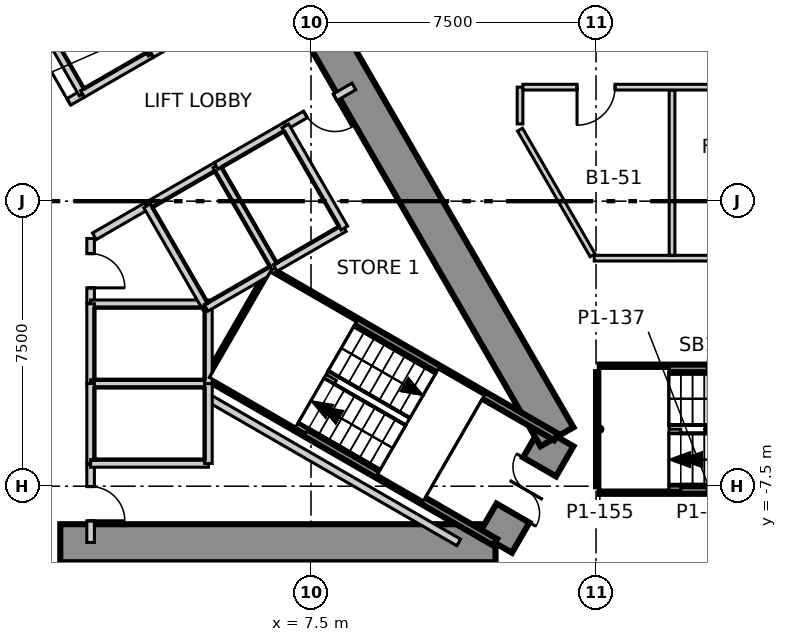
"""IFC4 building model, lengths in metres.
Left out: names, types, materials, properties, quantities, classifications, styles, units other than length and angle.
Written with IfcOpenShell. Run it as: python <this file> out.ifc"""

import sys

from ifc_helpers import new_model, si_unit, direction, frame, frame_2d, origin, place, context, subcontext, project, spatial, polyline, rectangle, outline, extrude, element, fill, save


model = new_model("IFC4")
c1 = context("Model", 3, precision=1e-05, world=origin(), true_north=direction((0.0, 1.0)))
c2 = subcontext(c1, "Body", "Model", "MODEL_VIEW")
j1 = project(units=[si_unit("LENGTHUNIT", "METRE"), si_unit("PLANEANGLEUNIT", "RADIAN")], contexts=[c1])
p1 = place(None, origin())
s1 = spatial("IfcSite", under=j1, at=p1, CompositionType="ELEMENT")
p2 = place(p1, origin())
s2 = spatial("IfcBuilding", under=s1, at=p2, CompositionType="ELEMENT")
p3 = place(p2, frame((0.0, 0.0, -5.5)))
s3 = spatial("IfcBuildingStorey", under=s2, at=p3, CompositionType="ELEMENT", Elevation=-5.5)
p4 = place(p3, frame((34.944, -16.125, -0.4), z_axis=(0.0, 0.0, 1.0), x_axis=(-0.500003790369, 0.866023215403, 0.0)))
e1 = element("IfcWall", 1, at=p4, inside=s3, PredefinedType="SOLIDWALL", context=c2, shape_type="SweptSolid", body=[
    extrude(rectangle(XDim=62.874, YDim=0.6, at=frame_2d((31.437, 0.0))), origin(), (0.0, 0.0, 1.0), 5.5),
])
p5 = place(p3, frame((-12.355, -9.0, -0.4), z_axis=(0.0, 0.0, 1.0), x_axis=(1.0, 0.0, 0.0)))
e2 = element("IfcWall", 2, at=p5, inside=s3, PredefinedType="SHEAR", context=c2, shape_type="SweptSolid", body=[
    extrude(outline(polyline([(-0.289, -0.5), (1.656, -0.5), (3.601, -0.5), (5.547, -0.5), (7.492, -0.5), (9.437, -0.5), (11.382, -0.5), (13.328, -0.5), (15.273, -0.5), (17.218, -0.5), (19.163, -0.5), (21.109, -0.5), (23.054, -0.5), (24.999, -0.5), (24.422, 0.5), (22.566, 0.5), (20.709, 0.5), (18.853, 0.5), (16.996, 0.5), (15.14, 0.5), (13.283, 0.5), (11.427, 0.5), (9.57, 0.5), (7.714, 0.5), (5.857, 0.5), (4.001, 0.5), (2.145, 0.5), (0.288, 0.5), (-0.289, -0.5)])), origin(), (0.0, 0.0, 1.0), 5.5),
])
p6 = place(p5, frame((11.455, 0.0, 0.4)))
e3 = element("IfcOpeningElement", 3, at=p6, cuts=e2, PredefinedType="OPENING", context=c2, shape_type="SweptSolid", body=[
    extrude(rectangle(XDim=1.8, YDim=2.1, at=frame_2d((0.9, 1.05))), frame((0.0, 0.51, 0.0), z_axis=(0.0, -1.0, 0.0), x_axis=(1.0, 0.0, 0.0)), (0.0, 0.0, 1.0), 1.02),
])
p7 = place(p3, frame((12.355, -9.0, -0.4), z_axis=(0.0, 0.0, 1.0), x_axis=(0.500077567175, 0.865980615723, 0.0)))
e4 = element("IfcWall", 4, at=p7, inside=s3, PredefinedType="SHEAR", context=c2, shape_type="SweptSolid", body=[
    extrude(outline(polyline([(-0.288, -0.5), (1.617, -0.5), (3.522, -0.5), (2.945, 0.5), (1.617, 0.5), (0.289, 0.499), (-0.288, -0.5)])), origin(), (0.0, 0.0, 1.0), 5.5),
])
p8 = place(p7, frame((0.917, 0.0, 0.4)))
e5 = element("IfcOpeningElement", 5, at=p8, cuts=e4, PredefinedType="OPENING", context=c2, shape_type="SweptSolid", body=[
    extrude(rectangle(XDim=1.4, YDim=2.1, at=frame_2d((0.7, 1.05))), frame((0.0, 0.51, 0.0), z_axis=(0.0, -1.0, 0.0), x_axis=(1.0, 0.0, 0.0)), (0.0, 0.0, 1.0), 1.02),
])
p9 = place(p3, frame((13.972, -6.2, -0.4), z_axis=(0.0, 0.0, 1.0), x_axis=(-0.499992141631, 0.866029940768, 0.0)))
e6 = element("IfcWall", 6, at=p9, inside=s3, PredefinedType="SHEAR", context=c2, shape_type="SweptSolid", body=[
    extrude(outline(polyline([(-0.288, -0.5), (1.657, -0.5), (3.602, -0.5), (5.547, -0.5), (7.493, -0.5), (9.438, -0.5), (11.383, -0.5), (13.328, -0.5), (15.273, -0.5), (17.218, -0.499), (19.164, -0.499), (21.109, -0.499), (23.054, -0.499), (24.999, -0.499), (24.422, 0.5), (22.566, 0.5), (20.709, 0.5), (18.853, 0.5), (16.996, 0.5), (15.14, 0.5), (13.283, 0.5), (11.427, 0.5), (9.57, 0.5), (7.714, 0.5), (5.857, 0.5), (4.001, 0.5), (2.145, 0.5), (0.288, 0.5), (-0.288, -0.5)])), origin(), (0.0, 0.0, 1.0), 5.5),
])
p10 = place(p3, frame((14.953, -1.5, 0.0), z_axis=(0.0, 0.0, 1.0), x_axis=(1.0, 0.0, 0.0)))
e7 = element("IfcWall", 7, at=p10, inside=s3, PredefinedType="PARTITIONING", context=c2, shape_type="SweptSolid", body=[
    extrude(rectangle(XDim=9.047, YDim=0.15, at=frame_2d((4.523, 0.0))), origin(), (0.0, 0.0, 1.0), 4.5),
])
p11 = place(p10, frame((5.047, 0.0, 0.0)))
e8 = element("IfcOpeningElement", 8, at=p11, cuts=e7, PredefinedType="OPENING", context=c2, shape_type="SweptSolid", body=[
    extrude(rectangle(XDim=1.0, YDim=2.1, at=frame_2d((0.5, 1.05))), frame((0.0, 0.085, 0.0), z_axis=(0.0, -1.0, 0.0), x_axis=(1.0, 0.0, 0.0)), (0.0, 0.0, 1.0), 0.17),
])
p12 = place(p3, frame((17.0, -1.425, 0.0), z_axis=(0.0, 0.0, 1.0), x_axis=(0.0, 1.0, 0.0)))
e9 = element("IfcWall", 9, at=p12, inside=s3, PredefinedType="PARTITIONING", context=c2, shape_type="SweptSolid", body=[
    extrude(rectangle(XDim=4.35, YDim=0.15, at=frame_2d((2.175, 0.0))), origin(), (0.0, 0.0, 1.0), 5.1),
])
p13 = place(p3, frame((13.0, 1.883, 0.0), z_axis=(0.0, 0.0, 1.0), x_axis=(0.499995391149, -0.86602806469, 0.0)))
e10 = element("IfcWall", 10, at=p13, inside=s3, PredefinedType="PARTITIONING", context=c2, shape_type="SweptSolid", body=[
    extrude(rectangle(XDim=3.82, YDim=0.15, at=frame_2d((1.91, 0.0))), origin(), (0.0, 0.0, 1.0), 5.1),
])
p14 = place(p3, frame((13.0, 2.033, 0.0), z_axis=(0.0, 0.0, 1.0), x_axis=(0.0, 1.0, 0.0)))
e11 = element("IfcWall", 11, at=p14, inside=s3, PredefinedType="PARTITIONING", context=c2, shape_type="SweptSolid", body=[
    extrude(rectangle(XDim=0.967, YDim=0.15, at=frame_2d((0.483, 0.0))), origin(), (0.0, 0.0, 1.0), 5.1),
])
p15 = place(p3, frame((13.075, 3.0, 0.0), z_axis=(0.0, 0.0, 1.0), x_axis=(1.0, 0.0, 0.0)))
e12 = element("IfcWall", 12, at=p15, inside=s3, PredefinedType="PARTITIONING", context=c2, shape_type="SweptSolid", body=[
    extrude(rectangle(XDim=10.481, YDim=0.15, at=frame_2d((5.24, 0.0))), origin(), (0.0, 0.0, 1.0), 4.55),
])
p16 = place(p15, frame((1.425, 0.0, 0.0)))
e13 = element("IfcOpeningElement", 13, at=p16, cuts=e12, PredefinedType="OPENING", context=c2, shape_type="SweptSolid", body=[
    extrude(rectangle(XDim=1.0, YDim=2.1, at=frame_2d((0.5, 1.05))), frame((0.0, 0.085, 0.0), z_axis=(0.0, -1.0, 0.0), x_axis=(1.0, 0.0, 0.0)), (0.0, 0.0, 1.0), 0.17),
])
p17 = place(p3, frame((0.1, 2.021, 0.0), z_axis=(0.0, 0.0, 1.0), x_axis=(0.866188150584, 0.499718008269, 0.0)))
e14 = element("IfcWall", 14, at=p17, inside=s3, PredefinedType="SOLIDWALL", context=c2, shape_type="SweptSolid", body=[
    extrude(rectangle(XDim=1.585, YDim=0.2, at=frame_2d((0.792, 0.0))), origin(), (0.0, 0.0, 1.0), 5.1),
])
p18 = place(p17, frame((0.284, 0.0, 0.0)))
e15 = element("IfcOpeningElement", 15, at=p18, cuts=e14, PredefinedType="OPENING", context=c2, shape_type="SweptSolid", body=[
    extrude(rectangle(XDim=0.9, YDim=2.1, at=frame_2d((0.45, 1.05))), frame((0.0, 0.11, 0.0), z_axis=(0.0, -1.0, 0.0), x_axis=(1.0, 0.0, 0.0)), (0.0, 0.0, 1.0), 0.22),
])
p19 = place(p3, frame((1.7, -8.98, 0.0), z_axis=(0.0, 0.0, 1.0), x_axis=(0.0, 1.0, 0.0)))
e16 = element("IfcWall", 16, at=p19, inside=s3, PredefinedType="SOLIDWALL", context=c2, shape_type="SweptSolid", body=[
    extrude(rectangle(XDim=2.062, YDim=0.2, at=frame_2d((1.031, 0.0))), origin(), (0.0, 0.0, 1.0), 5.1),
])
p20 = place(p19, frame((0.57, 0.0, 0.0)))
e17 = element("IfcOpeningElement", 17, at=p20, cuts=e16, PredefinedType="OPENING", context=c2, shape_type="SweptSolid", body=[
    extrude(rectangle(XDim=0.9, YDim=2.1, at=frame_2d((0.45, 1.05))), frame((0.0, 0.11, 0.0), z_axis=(0.0, -1.0, 0.0), x_axis=(1.0, 0.0, 0.0)), (0.0, 0.0, 1.0), 0.22),
])
p21 = place(p3, frame((1.7, -2.682, 0.0), z_axis=(0.0, 0.0, 1.0), x_axis=(0.0, 1.0, 0.0)))
e18 = element("IfcWall", 18, at=p21, inside=s3, PredefinedType="SOLIDWALL", context=c2, shape_type="SweptSolid", body=[
    extrude(rectangle(XDim=1.701, YDim=0.2, at=frame_2d((0.851, 0.0))), origin(), (0.0, 0.0, 1.0), 5.1),
])
p22 = place(p21, frame((0.401, 0.0, 0.0)))
e19 = element("IfcOpeningElement", 19, at=p22, cuts=e18, PredefinedType="OPENING", context=c2, shape_type="SweptSolid", body=[
    extrude(rectangle(XDim=0.9, YDim=2.1, at=frame_2d((0.45, 1.05))), frame((0.0, 0.11, 0.0), z_axis=(0.0, -1.0, 0.0), x_axis=(1.0, 0.0, 0.0)), (0.0, 0.0, 1.0), 0.22),
])
p23 = place(p3, frame((1.8, -0.924, 0.0), z_axis=(0.0, 0.0, 1.0), x_axis=(0.865959917263, 0.500113408832, 0.0)))
e20 = element("IfcWall", 20, at=p23, inside=s3, PredefinedType="SOLIDWALL", context=c2, shape_type="SweptSolid", body=[
    extrude(rectangle(XDim=1.586, YDim=0.2, at=frame_2d((0.793, 0.0))), origin(), (0.0, 0.0, 1.0), 5.1),
])
p24 = place(p3, frame((6.841, 1.987, 0.0), z_axis=(0.0, 0.0, 1.0), x_axis=(0.866041665719, 0.499971832445, 0.0)))
e21 = element("IfcWall", 21, at=p24, inside=s3, PredefinedType="SOLIDWALL", context=c2, shape_type="SweptSolid", body=[
    extrude(rectangle(XDim=2.062, YDim=0.2, at=frame_2d((1.031, 0.0))), origin(), (0.0, 0.0, 1.0), 5.1),
])
p25 = place(p24, frame((0.592, 0.0, 0.0)))
e22 = element("IfcOpeningElement", 22, at=p25, cuts=e21, PredefinedType="OPENING", context=c2, shape_type="SweptSolid", body=[
    extrude(rectangle(XDim=0.9, YDim=2.1, at=frame_2d((0.45, 1.05))), frame((0.0, 0.11, 0.0), z_axis=(0.0, -1.0, 0.0), x_axis=(1.0, 0.0, 0.0)), (0.0, 0.0, 1.0), 0.22),
])
p26 = place(p3, frame((4.82, -5.188, 0.0), z_axis=(0.0, 0.0, 1.0), x_axis=(0.86599149085, -0.500058734325, 0.0)))
e23 = element("IfcWall", 23, at=p26, inside=s3, PredefinedType="SOLIDWALL", context=c2, shape_type="SweptSolid", body=[
    extrude(rectangle(XDim=7.583, YDim=0.2, at=frame_2d((3.792, 0.0))), origin(), (0.0, 0.0, 1.0), 5.1),
])
p27 = place(p3, frame((4.829, -4.636, 0.0), z_axis=(0.0, 0.0, 1.0), x_axis=(0.866013680014, -0.500020305616, 0.0)))
e24 = element("IfcWall", 24, at=p27, inside=s3, PredefinedType="SOLIDWALL", context=c2, shape_type="SweptSolid", body=[
    extrude(rectangle(XDim=8.68, YDim=0.2, at=frame_2d((4.34, 0.0))), origin(), (0.0, 0.0, 1.0), 5.1),
])
p28 = place(p3, frame((4.879, -4.549, 0.0), z_axis=(0.0, 0.0, 1.0), x_axis=(0.499958760481, 0.866049212123, 0.0)))
e25 = element("IfcWall", 25, at=p28, inside=s3, PredefinedType="SOLIDWALL", context=c2, shape_type="SweptSolid", body=[
    extrude(rectangle(XDim=3.1, YDim=0.2, at=frame_2d((1.55, 0.0))), origin(), (0.0, 0.0, 1.0), 5.1),
])
p29 = place(p3, frame((6.516, -1.914, 0.0), z_axis=(0.0, 0.0, 1.0), x_axis=(0.866006929508, -0.50003199702, 0.0)))
e26 = element("IfcWall", 26, at=p29, inside=s3, PredefinedType="SOLIDWALL", context=c2, shape_type="SweptSolid", body=[
    extrude(rectangle(XDim=8.58, YDim=0.2, at=frame_2d((4.29, 0.0))), origin(), (0.0, 0.0, 1.0), 5.1),
])
for number, where, z_axis, x_axis in (
    (27, (15.1, -4.4, 0.0), (0.0, 0.0, 1.0), (1.0, 0.0, 0.0)),
    (28, (15.1, -7.6, 0.0), (0.0, 0.0, 1.0), (1.0, 0.0, 0.0)),
):
    element("IfcWall", number, at=place(p3, frame(where, z_axis=z_axis, x_axis=x_axis)), inside=s3, PredefinedType="SOLIDWALL", context=c2, shape_type="SweptSolid", body=[
        extrude(rectangle(XDim=5.8, YDim=0.2, at=frame_2d((2.9, 0.0))), origin(), (0.0, 0.0, 1.0), 5.1),
    ])
p30 = place(p3, frame((15.1, -7.5, 0.0), z_axis=(0.0, 0.0, 1.0), x_axis=(0.0, 1.0, 0.0)))
e29 = element("IfcWall", 29, at=p30, inside=s3, PredefinedType="SOLIDWALL", context=c2, shape_type="SweptSolid", body=[
    extrude(rectangle(XDim=3.0, YDim=0.2, at=frame_2d((1.5, 0.0))), origin(), (0.0, 0.0, 1.0), 5.1),
])
p31 = place(p3, frame((4.8, -2.7, 3.9), z_axis=(0.0, 0.0, 1.0), x_axis=(-1.0, 0.0, 0.0)))
e30 = element("IfcWall", 30, at=p31, inside=s3, PredefinedType="SOLIDWALL", context=c2, shape_type="SweptSolid", body=[
    extrude(outline(polyline([(-0.1, -0.1), (0.1, 0.1), (1.55, 0.1), (3.0, 0.1), (3.2, -0.1), (1.55, -0.1), (-0.1, -0.1)])), origin(), (0.0, 0.0, 1.0), 1.2),
])
p32 = place(p3, frame((1.7, -2.7, 3.9), z_axis=(0.0, 0.0, 1.0), x_axis=(0.0, -1.0, 0.0)))
e31 = element("IfcWall", 31, at=p32, inside=s3, PredefinedType="SOLIDWALL", context=c2, shape_type="SweptSolid", body=[
    extrude(outline(polyline([(2.0, 0.1), (2.2, -0.1), (1.05, -0.1), (-0.099, -0.1), (0.1, 0.1), (0.1, 0.1), (0.1, 0.1), (0.1, 0.1), (0.1, 0.1), (0.1, 0.1), (0.1, 0.1), (0.1, 0.1), (0.101, 0.1), (2.0, 0.1)])), origin(), (0.0, 0.0, 1.0), 1.2),
])
p33 = place(p3, frame((1.7, -4.8, 3.9), z_axis=(0.0, 0.0, 1.0), x_axis=(1.0, 0.0, 0.0)))
e32 = element("IfcWall", 32, at=p33, inside=s3, PredefinedType="SOLIDWALL", context=c2, shape_type="SweptSolid", body=[
    extrude(outline(polyline([(3.0, 0.1), (3.2, -0.1), (1.55, -0.1), (-0.099, -0.1), (0.1, 0.1), (0.1, 0.1), (0.1, 0.1), (0.1, 0.1), (0.1, 0.1), (0.1, 0.1), (0.1, 0.1), (0.1, 0.1), (0.101, 0.1), (1.551, 0.1), (3.0, 0.1)])), origin(), (0.0, 0.0, 1.0), 1.2),
])
p34 = place(p3, frame((4.8, -4.8, 3.9), z_axis=(0.0, 0.0, 1.0), x_axis=(0.0, 1.0, 0.0)))
e33 = element("IfcWall", 33, at=p34, inside=s3, PredefinedType="SOLIDWALL", context=c2, shape_type="SweptSolid", body=[
    extrude(outline(polyline([(1.999, 0.1), (2.0, 0.1), (2.0, 0.1), (2.0, 0.1), (2.0, 0.1), (2.0, 0.1), (2.0, 0.1), (2.0, 0.1), (2.0, 0.1), (2.199, -0.1), (1.05, -0.1), (-0.099, -0.1), (0.1, 0.1), (0.1, 0.1), (0.1, 0.1), (0.1, 0.1), (0.1, 0.1), (0.1, 0.1), (0.1, 0.1), (0.1, 0.1), (0.1, 0.1), (1.999, 0.1)])), origin(), (0.0, 0.0, 1.0), 1.2),
])
p35 = place(p3, frame((1.7, -4.8, 3.9), z_axis=(0.0, 0.0, 1.0), x_axis=(0.0, -1.0, 0.0)))
e34 = element("IfcWall", 34, at=p35, inside=s3, PredefinedType="SOLIDWALL", context=c2, shape_type="SweptSolid", body=[
    extrude(outline(polyline([(2.0, 0.1), (2.2, -0.1), (1.15, -0.1), (0.1, -0.1), (0.1, -0.1), (0.1, 0.1), (2.0, 0.1)])), origin(), (0.0, 0.0, 1.0), 1.2),
])
p36 = place(p3, frame((1.7, -6.9, 3.9), z_axis=(0.0, 0.0, 1.0), x_axis=(1.0, 0.0, 0.0)))
e35 = element("IfcWall", 35, at=p36, inside=s3, PredefinedType="SOLIDWALL", context=c2, shape_type="SweptSolid", body=[
    extrude(outline(polyline([(3.0, 0.1), (3.2, -0.1), (1.55, -0.1), (-0.099, -0.1), (0.1, 0.1), (0.1, 0.1), (0.1, 0.1), (0.1, 0.1), (0.1, 0.1), (0.1, 0.1), (0.1, 0.1), (0.1, 0.1), (0.101, 0.1), (1.551, 0.1), (3.0, 0.1)])), origin(), (0.0, 0.0, 1.0), 1.2),
])
p37 = place(p3, frame((4.8, -6.9, 3.9), z_axis=(0.0, 0.0, 1.0), x_axis=(0.0, 1.0, 0.0)))
e36 = element("IfcWall", 36, at=p37, inside=s3, PredefinedType="SOLIDWALL", context=c2, shape_type="SweptSolid", body=[
    extrude(outline(polyline([(2.0, 0.1), (2.0, -0.1), (0.95, -0.1), (-0.099, -0.1), (0.1, 0.1), (0.1, 0.1), (0.1, 0.1), (0.1, 0.1), (0.1, 0.1), (0.1, 0.1), (0.1, 0.1), (0.1, 0.1), (0.1, 0.1), (2.0, 0.1)])), origin(), (0.0, 0.0, 1.0), 1.2),
])
p38 = place(p3, frame((-0.062, 5.507, 3.9), z_axis=(0.0, 0.0, 1.0), x_axis=(0.499958760481, -0.866049212123, 0.0)))
e37 = element("IfcWall", 37, at=p38, inside=s3, PredefinedType="SOLIDWALL", context=c2, shape_type="SweptSolid", body=[
    extrude(outline(polyline([(0.1, 0.1), (1.55, 0.1), (3.0, 0.1), (3.2, -0.1), (1.55, -0.1), (-0.1, -0.1), (0.1, 0.1)])), origin(), (0.0, 0.0, 1.0), 1.2),
])
p39 = place(p3, frame((1.488, 2.822, 3.9), z_axis=(0.0, 0.0, 1.0), x_axis=(0.866038466041, 0.499977374825, 0.0)))
e38 = element("IfcWall", 38, at=p39, inside=s3, PredefinedType="SOLIDWALL", context=c2, shape_type="SweptSolid", body=[
    extrude(outline(polyline([(2.0, 0.1), (2.2, -0.1), (1.05, -0.1), (-0.099, -0.1), (0.1, 0.1), (0.1, 0.1), (0.1, 0.1), (0.1, 0.1), (0.1, 0.1), (0.1, 0.1), (0.1, 0.1), (0.1, 0.1), (0.1, 0.1), (2.0, 0.1)])), origin(), (0.0, 0.0, 1.0), 1.2),
])
p40 = place(p3, frame((3.307, 3.872, 3.9), z_axis=(0.0, 0.0, 1.0), x_axis=(-0.499933790963, 0.866063626216, 0.0)))
e39 = element("IfcWall", 39, at=p40, inside=s3, PredefinedType="SOLIDWALL", context=c2, shape_type="SweptSolid", body=[
    extrude(outline(polyline([(3.0, 0.1), (3.2, -0.1), (1.55, -0.1), (-0.099, -0.1), (0.1, 0.1), (0.1, 0.1), (0.1, 0.1), (0.1, 0.1), (0.1, 0.1), (0.1, 0.1), (0.1, 0.1), (0.101, 0.1), (0.101, 0.1), (0.101, 0.1), (1.551, 0.1), (3.0, 0.1)])), origin(), (0.0, 0.0, 1.0), 1.2),
])
p41 = place(p3, frame((3.307, 3.872, 3.9), z_axis=(0.0, 0.0, 1.0), x_axis=(0.866067520717, 0.499927044236, 0.0)))
e40 = element("IfcWall", 40, at=p41, inside=s3, PredefinedType="SOLIDWALL", context=c2, shape_type="SweptSolid", body=[
    extrude(outline(polyline([(2.0, 0.1), (2.2, -0.1), (1.15, -0.1), (0.101, -0.1), (0.101, -0.1), (0.1, 0.1), (2.0, 0.1)])), origin(), (0.0, 0.0, 1.0), 1.2),
])
p42 = place(p3, frame((5.007, 0.928, 3.9), z_axis=(0.0, 0.0, 1.0), x_axis=(-0.866067520717, -0.499927044236, 0.0)))
e41 = element("IfcWall", 41, at=p42, inside=s3, PredefinedType="SOLIDWALL", context=c2, shape_type="SweptSolid", body=[
    extrude(outline(polyline([(0.1, 0.1), (2.0, 0.1), (2.2, -0.1), (1.05, -0.1), (-0.1, -0.1), (0.1, 0.1)])), origin(), (0.0, 0.0, 1.0), 1.2),
])
p43 = place(p3, frame((3.188, -0.122, 3.9), z_axis=(0.0, 0.0, 1.0), x_axis=(0.49999285859, -0.86602952684, 0.0)))
e42 = element("IfcWall", 42, at=p43, inside=s3, PredefinedType="SOLIDWALL", context=c2, shape_type="SweptSolid", body=[
    extrude(outline(polyline([(2.918, 0.1), (2.803, -0.1), (1.352, -0.1), (-0.099, -0.1), (0.1, 0.1), (0.1, 0.1), (0.1, 0.1), (0.1, 0.1), (0.1, 0.1), (0.1, 0.1), (0.1, 0.1), (0.101, 0.1), (0.101, 0.1), (0.101, 0.1), (1.51, 0.1), (2.918, 0.1)])), origin(), (0.0, 0.0, 1.0), 1.2),
])
p44 = place(p3, frame((4.738, -2.807, 3.9), z_axis=(0.0, 0.0, 1.0), x_axis=(0.866088799389, 0.499890179513, 0.0)))
e43 = element("IfcWall", 43, at=p44, inside=s3, PredefinedType="SOLIDWALL", context=c2, shape_type="SweptSolid", body=[
    extrude(outline(polyline([(2.0, 0.1), (2.2, -0.1), (1.165, -0.1), (0.13, -0.1), (0.244, 0.098), (0.244, 0.098), (0.244, 0.098), (0.244, 0.098), (0.244, 0.098), (0.244, 0.098), (0.244, 0.098), (0.244, 0.098), (0.244, 0.098), (0.244, 0.098), (0.244, 0.099), (0.244, 0.099), (0.244, 0.099), (0.244, 0.099), (0.244, 0.099), (0.244, 0.099), (0.244, 0.099), (0.242, 0.1), (2.0, 0.1)])), origin(), (0.0, 0.0, 1.0), 1.2),
])
p45 = place(p3, frame((6.557, -1.757, 3.9), z_axis=(0.0, 0.0, 1.0), x_axis=(-0.499899694197, 0.866083307622, 0.0)))
e44 = element("IfcWall", 44, at=p45, inside=s3, PredefinedType="SOLIDWALL", context=c2, shape_type="SweptSolid", body=[
    extrude(outline(polyline([(3.0, 0.1), (3.0, 0.1), (3.0, 0.1), (3.0, 0.1), (3.0, 0.1), (3.0, 0.1), (3.0, 0.1), (3.0, 0.1), (3.0, 0.1), (3.2, -0.1), (1.55, -0.1), (-0.099, -0.1), (0.1, 0.1), (0.1, 0.1), (0.1, 0.1), (0.1, 0.1), (0.1, 0.1), (0.1, 0.1), (0.1, 0.1), (0.101, 0.1), (0.101, 0.1), (0.101, 0.1), (1.551, 0.1), (3.0, 0.1)])), origin(), (0.0, 0.0, 1.0), 1.2),
])
p46 = place(p3, frame((6.826, 1.978, 3.9), z_axis=(0.0, 0.0, 1.0), x_axis=(-0.866038466041, -0.499977374825, 0.0)))
e45 = element("IfcWall", 45, at=p46, inside=s3, PredefinedType="SOLIDWALL", context=c2, shape_type="SweptSolid", body=[
    extrude(outline(polyline([(0.1, 0.1), (2.0, 0.1), (2.0, -0.1), (0.95, -0.1), (-0.1, -0.1), (0.1, 0.1)])), origin(), (0.0, 0.0, 1.0), 1.2),
])
p47 = place(p3, frame((6.557, -1.757, 3.9), z_axis=(0.0, 0.0, 1.0), x_axis=(0.866067520717, 0.499927044236, 0.0)))
e46 = element("IfcWall", 46, at=p47, inside=s3, PredefinedType="SOLIDWALL", context=c2, shape_type="SweptSolid", body=[
    extrude(outline(polyline([(2.0, 0.1), (2.2, -0.1), (1.15, -0.1), (0.101, -0.1), (0.101, -0.1), (0.1, 0.1), (2.0, 0.1)])), origin(), (0.0, 0.0, 1.0), 1.2),
])
p48 = place(p3, frame((8.376, -0.707, 3.9), z_axis=(0.0, 0.0, 1.0), x_axis=(-0.499958760481, 0.866049212123, 0.0)))
e47 = element("IfcWall", 47, at=p48, inside=s3, PredefinedType="SOLIDWALL", context=c2, shape_type="SweptSolid", body=[
    extrude(outline(polyline([(3.0, 0.1), (3.0, 0.1), (3.0, 0.1), (3.0, 0.1), (3.0, 0.1), (3.0, 0.1), (3.0, 0.1), (3.0, 0.1), (3.0, 0.1), (3.2, -0.1), (1.55, -0.1), (-0.099, -0.1), (0.1, 0.1), (0.1, 0.1), (0.1, 0.1), (0.1, 0.1), (0.1, 0.1), (0.1, 0.1), (0.1, 0.1), (0.101, 0.1), (0.101, 0.1), (0.101, 0.1), (1.551, 0.1), (3.0, 0.1)])), origin(), (0.0, 0.0, 1.0), 1.2),
])
p49 = place(p16, origin())
e48 = element("IfcDoor", 48, at=p49, inside=s3, OperationType="SINGLE_SWING_LEFT", PredefinedType="DOOR", context=c2, shape_type="SweptSolid", body=[
    extrude(rectangle(XDim=1.0, YDim=2.1, at=frame_2d((0.5, 1.05))), frame((0.0, 0.025, 0.0), z_axis=(0.0, -1.0, 0.0), x_axis=(1.0, 0.0, 0.0)), (0.0, 0.0, 1.0), 0.05),
])
fill(e13, e48)
p50 = place(p6, origin())
e49 = element("IfcDoor", 49, at=p50, inside=s3, OperationType="DOUBLE_DOOR_SINGLE_SWING", PredefinedType="DOOR", context=c2, shape_type="SweptSolid", body=[
    extrude(rectangle(XDim=1.8, YDim=2.1, at=frame_2d((0.9, 1.05))), frame((0.0, 0.025, 0.0), z_axis=(0.0, -1.0, 0.0), x_axis=(1.0, 0.0, 0.0)), (0.0, 0.0, 1.0), 0.05),
])
fill(e3, e49)
p51 = place(p8, origin())
e50 = element("IfcDoor", 50, at=p51, inside=s3, OperationType="DOUBLE_DOOR_SINGLE_SWING", PredefinedType="DOOR", context=c2, shape_type="SweptSolid", body=[
    extrude(rectangle(XDim=1.4, YDim=2.1, at=frame_2d((0.7, 1.05))), frame((0.0, 0.025, 0.0), z_axis=(0.0, -1.0, 0.0), x_axis=(1.0, 0.0, 0.0)), (0.0, 0.0, 1.0), 0.05),
])
fill(e5, e50)
p52 = place(p18, origin())
e51 = element("IfcDoor", 51, at=p52, inside=s3, OperationType="SINGLE_SWING_LEFT", PredefinedType="DOOR", context=c2, shape_type="SweptSolid", body=[
    extrude(rectangle(XDim=0.9, YDim=2.1, at=frame_2d((0.45, 1.05))), frame((0.0, 0.025, 0.0), z_axis=(0.0, -1.0, 0.0), x_axis=(1.0, 0.0, 0.0)), (0.0, 0.0, 1.0), 0.05),
])
fill(e15, e51)
p53 = place(p22, origin())
e52 = element("IfcDoor", 52, at=p53, inside=s3, OperationType="SINGLE_SWING_LEFT", PredefinedType="DOOR", context=c2, shape_type="SweptSolid", body=[
    extrude(rectangle(XDim=0.9, YDim=2.1, at=frame_2d((0.45, 1.05))), frame((0.0, 0.025, 0.0), z_axis=(0.0, -1.0, 0.0), x_axis=(1.0, 0.0, 0.0)), (0.0, 0.0, 1.0), 0.05),
])
fill(e19, e52)
p54 = place(p20, origin())
e53 = element("IfcDoor", 53, at=p54, inside=s3, OperationType="SINGLE_SWING_LEFT", PredefinedType="DOOR", context=c2, shape_type="SweptSolid", body=[
    extrude(rectangle(XDim=0.9, YDim=2.1, at=frame_2d((0.45, 1.05))), frame((0.0, 0.025, 0.0), z_axis=(0.0, -1.0, 0.0), x_axis=(1.0, 0.0, 0.0)), (0.0, 0.0, 1.0), 0.05),
])
fill(e17, e53)
p55 = place(p25, origin())
e54 = element("IfcDoor", 54, at=p55, inside=s3, OperationType="SINGLE_SWING_RIGHT", PredefinedType="DOOR", context=c2, shape_type="SweptSolid", body=[
    extrude(rectangle(XDim=0.9, YDim=2.1, at=frame_2d((0.45, 1.05))), frame((0.0, 0.025, 0.0), z_axis=(0.0, -1.0, 0.0), x_axis=(1.0, 0.0, 0.0)), (0.0, 0.0, 1.0), 0.05),
])
fill(e22, e54)
save(model, sys.argv[1])
